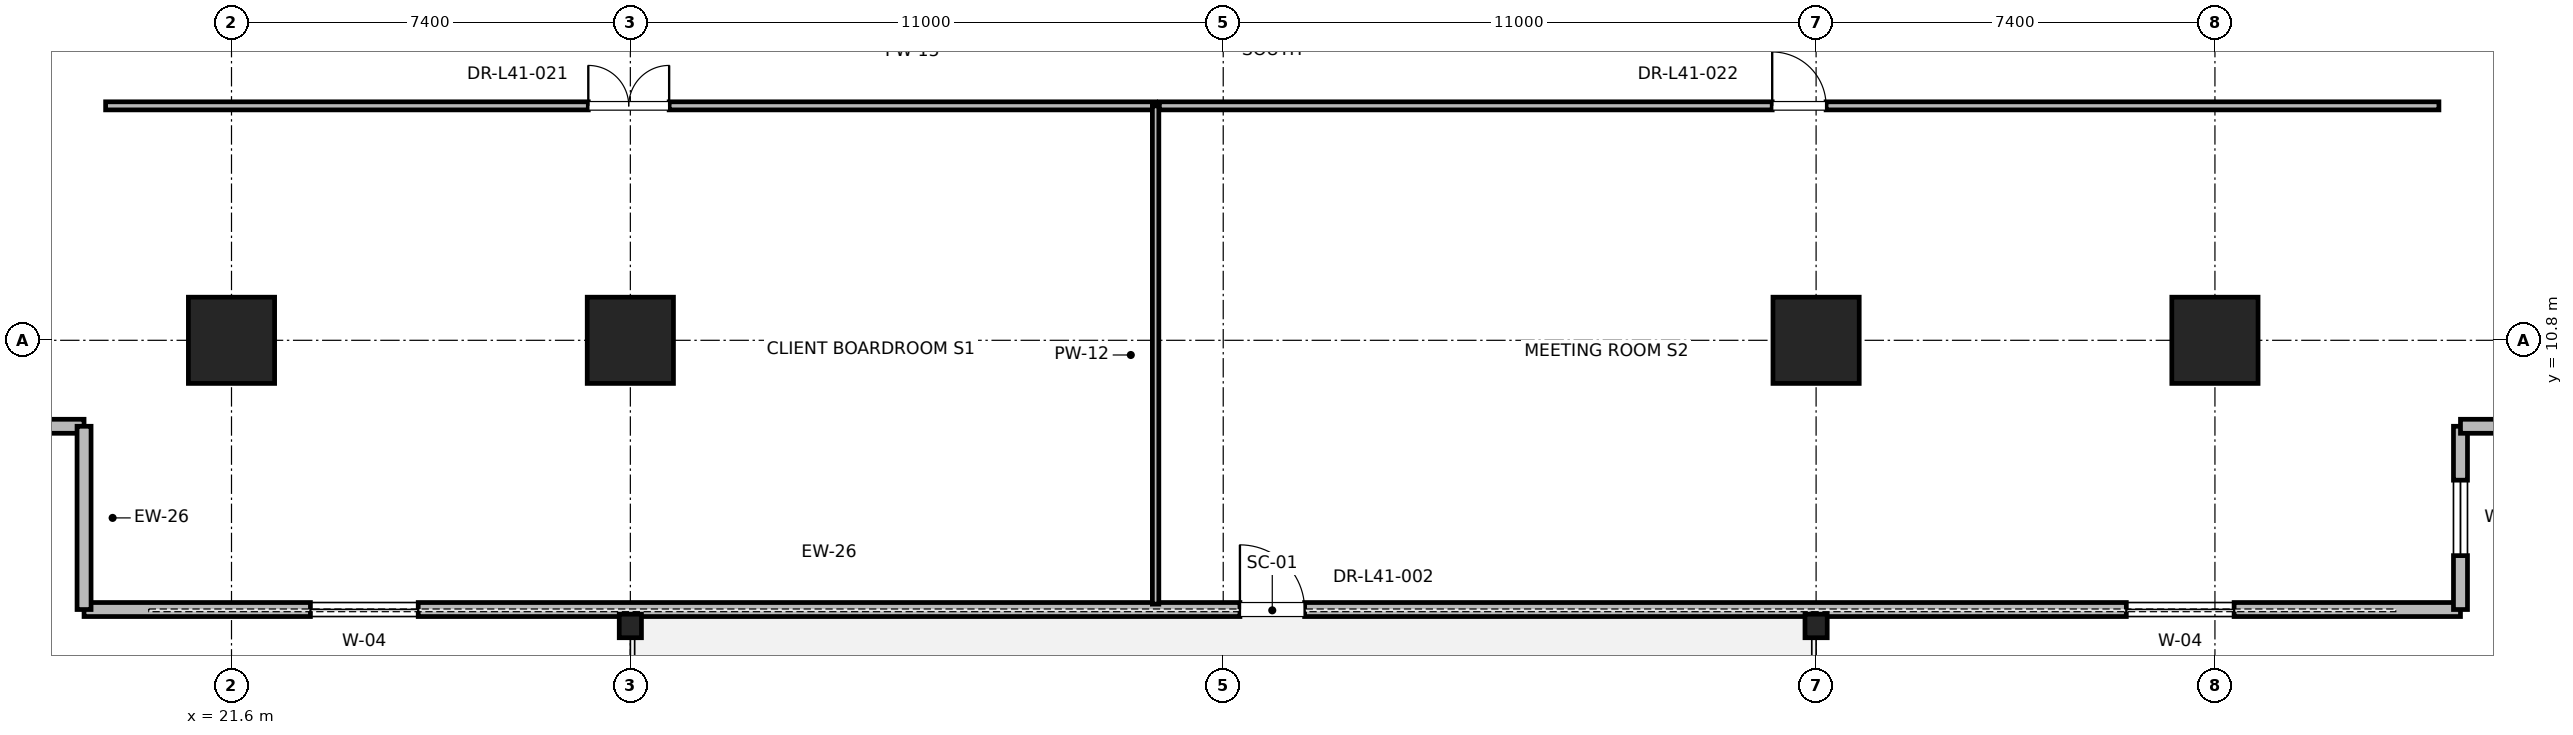
"""IFC4 building model, lengths in metres.
Left out: names, types, materials, properties, quantities, classifications, styles, units other than length and angle.
Written with IfcOpenShell. Run it as: python <this file> out.ifc"""

import sys

from ifc_helpers import new_model, si_unit, direction, frame, frame_2d, origin, origin_2d, place, context, subcontext, project, spatial, rectangle, i_section, extrude, element, fill, save


model = new_model("IFC4")
c1 = context("Model", 3, precision=1e-05, world=origin(), true_north=direction((0.0, 1.0)))
c2 = subcontext(c1, "Body", "Model", "MODEL_VIEW")
j1 = project(units=[si_unit("LENGTHUNIT", "METRE"), si_unit("PLANEANGLEUNIT", "RADIAN")], contexts=[c1])
p1 = place(None, origin())
s1 = spatial("IfcSite", under=j1, at=p1, CompositionType="ELEMENT")
p2 = place(p1, origin())
s2 = spatial("IfcBuilding", under=s1, at=p2, CompositionType="ELEMENT")
p3 = place(p2, frame((0.0, 0.0, 176.4)))
s3 = spatial("IfcBuildingStorey", under=s2, at=p3, CompositionType="ELEMENT", Elevation=176.4)
for number, where, z_axis, x_axis in (
    (1, (29.0, 10.8, 0.0), (0.0, 0.0, 1.0), (1.0, 0.0, 0.0)),
    (2, (51.0, 10.8, 0.0), (0.0, 0.0, 1.0), (1.0, 0.0, 0.0)),
    (3, (21.6, 10.8, 0.0), (0.0, 0.0, 1.0), (1.0, 0.0, 0.0)),
    (4, (58.4, 10.8, 0.0), (0.0, 0.0, 1.0), (1.0, 0.0, 0.0)),
):
    element("IfcColumn", number, at=place(p3, frame(where, z_axis=z_axis, x_axis=x_axis)), inside=s3, PredefinedType="COLUMN", context=c2, shape_type="SweptSolid", body=[
        extrude(rectangle(XDim=1.6, YDim=1.6, at=origin_2d()), origin(), (0.0, 0.0, 1.0), 4.0),
    ])
for number, where, z_axis, x_axis in (
    (5, (29.0, 5.5, 0.0), (0.0, 0.0, 1.0), (1.0, 0.0, 0.0)),
    (6, (51.0, 5.5, 0.0), (0.0, 0.0, 1.0), (1.0, 0.0, 0.0)),
):
    element("IfcColumn", number, at=place(p3, frame(where, z_axis=z_axis, x_axis=x_axis)), inside=s3, PredefinedType="COLUMN", context=c2, shape_type="SweptSolid", body=[
        extrude(i_section(OverallWidth=0.412, OverallDepth=0.437, WebThickness=0.036, FlangeThickness=0.058, FilletRadius=0.015, at=origin_2d()), origin(), (0.0, 0.0, 1.0), 4.0),
    ])
p4 = place(p3, frame((18.864, 5.805, 0.0), z_axis=(0.0, 0.0, 1.0), x_axis=(1.0, 0.0, 0.0)))
e7 = element("IfcWall", 7, at=p4, inside=s3, PredefinedType="PARAPET", context=c2, shape_type="SweptSolid", body=[
    extrude(rectangle(XDim=44.092, YDim=0.26, at=frame_2d((22.046, 0.0))), origin(), (0.0, 0.0, 1.0), 2.97),
])
p5 = place(p4, frame((4.2, 0.0, 0.85)))
e8 = element("IfcOpeningElement", 8, at=p5, cuts=e7, PredefinedType="OPENING", context=c2, shape_type="SweptSolid", body=[
    extrude(rectangle(XDim=2.0, YDim=2.3, at=frame_2d((1.0, 1.15))), frame((0.0, 0.13, 0.0), z_axis=(0.0, -1.0, 0.0), x_axis=(1.0, 0.0, 0.0)), (0.0, 0.0, 1.0), 0.26),
])
p6 = place(p4, frame((21.446, 0.0, 0.0)))
e9 = element("IfcOpeningElement", 9, at=p6, cuts=e7, PredefinedType="OPENING", context=c2, shape_type="SweptSolid", body=[
    extrude(rectangle(XDim=1.2, YDim=2.2, at=frame_2d((0.6, 1.1))), frame((0.0, 0.13, 0.0), z_axis=(0.0, -1.0, 0.0), x_axis=(1.0, 0.0, 0.0)), (0.0, 0.0, 1.0), 0.26),
])
p7 = place(p4, frame((37.891, 0.0, 0.85)))
e10 = element("IfcOpeningElement", 10, at=p7, cuts=e7, PredefinedType="OPENING", context=c2, shape_type="SweptSolid", body=[
    extrude(rectangle(XDim=2.0, YDim=2.3, at=frame_2d((1.0, 1.15))), frame((0.0, 0.13, 0.0), z_axis=(0.0, -1.0, 0.0), x_axis=(1.0, 0.0, 0.0)), (0.0, 0.0, 1.0), 0.26),
])
p8 = place(p3, frame((15.064, 9.205, 0.0), z_axis=(0.0, 0.0, 1.0), x_axis=(1.0, 0.0, 0.0)))
e11 = element("IfcWall", 11, at=p8, inside=s3, PredefinedType="PARAPET", context=c2, shape_type="SweptSolid", body=[
    extrude(rectangle(XDim=3.8, YDim=0.26, at=frame_2d((1.9, 0.0))), origin(), (0.0, 0.0, 1.0), 3.775),
])
p9 = place(p8, frame((1.2, 0.0, 0.85)))
e12 = element("IfcOpeningElement", 12, at=p9, cuts=e11, PredefinedType="OPENING", context=c2, shape_type="SweptSolid", body=[
    extrude(rectangle(XDim=1.4, YDim=2.0, at=frame_2d((0.7, 1.0))), frame((0.0, 0.13, 0.0), z_axis=(0.0, -1.0, 0.0), x_axis=(1.0, 0.0, 0.0)), (0.0, 0.0, 1.0), 0.26),
])
p10 = place(p3, frame((18.864, 9.205, 0.0), z_axis=(0.0, 0.0, 1.0), x_axis=(0.0, -1.0, 0.0)))
e13 = element("IfcWall", 13, at=p10, inside=s3, PredefinedType="PARAPET", context=c2, shape_type="SweptSolid", body=[
    extrude(rectangle(XDim=3.4, YDim=0.26, at=frame_2d((1.7, 0.0))), origin(), (0.0, 0.0, 1.0), 3.775),
])
p11 = place(p3, frame((62.956, 5.805, 0.0), z_axis=(0.0, 0.0, 1.0), x_axis=(0.0, 1.0, 0.0)))
e14 = element("IfcWall", 14, at=p11, inside=s3, PredefinedType="PARAPET", context=c2, shape_type="SweptSolid", body=[
    extrude(rectangle(XDim=3.4, YDim=0.26, at=frame_2d((1.7, 0.0))), origin(), (0.0, 0.0, 1.0), 3.775),
])
p12 = place(p11, frame((1.0, 0.0, 0.85)))
e15 = element("IfcOpeningElement", 15, at=p12, cuts=e14, PredefinedType="OPENING", context=c2, shape_type="SweptSolid", body=[
    extrude(rectangle(XDim=1.4, YDim=2.0, at=frame_2d((0.7, 1.0))), frame((0.0, 0.13, 0.0), z_axis=(0.0, -1.0, 0.0), x_axis=(1.0, 0.0, 0.0)), (0.0, 0.0, 1.0), 0.26),
])
p13 = place(p3, frame((62.956, 9.205, 0.0), z_axis=(0.0, 0.0, 1.0), x_axis=(1.0, 0.0, 0.0)))
e16 = element("IfcWall", 16, at=p13, inside=s3, PredefinedType="PARAPET", context=c2, shape_type="SweptSolid", body=[
    extrude(rectangle(XDim=3.8, YDim=0.26, at=frame_2d((1.9, 0.0))), origin(), (0.0, 0.0, 1.0), 3.775),
])
p14 = place(p3, frame((19.264, 15.15, 0.0), z_axis=(0.0, 0.0, 1.0), x_axis=(1.0, 0.0, 0.0)))
e17 = element("IfcWall", 17, at=p14, inside=s3, PredefinedType="PARTITIONING", context=c2, shape_type="SweptSolid", body=[
    extrude(rectangle(XDim=19.481, YDim=0.15, at=frame_2d((9.74, 0.0))), origin(), (0.0, 0.0, 1.0), 2.85),
])
p15 = place(p14, frame((8.956, 0.0, 0.0)))
e18 = element("IfcOpeningElement", 18, at=p15, cuts=e17, PredefinedType="OPENING", context=c2, shape_type="SweptSolid", body=[
    extrude(rectangle(XDim=1.5, YDim=2.25, at=frame_2d((0.75, 1.125))), frame((0.0, 0.075, 0.0), z_axis=(0.0, -1.0, 0.0), x_axis=(1.0, 0.0, 0.0)), (0.0, 0.0, 1.0), 0.15),
])
p16 = place(p3, frame((38.745, 5.905, 0.0), z_axis=(0.0, 0.0, 1.0), x_axis=(0.0, 1.0, 0.0)))
e19 = element("IfcWall", 19, at=p16, inside=s3, PredefinedType="PARTITIONING", context=c2, shape_type="SweptSolid", body=[
    extrude(rectangle(XDim=9.245, YDim=0.12, at=frame_2d((4.623, 0.0))), origin(), (0.0, 0.0, 1.0), 2.405),
])
p17 = place(p3, frame((38.815, 15.15, 0.0), z_axis=(0.0, 0.0, 1.0), x_axis=(1.0, 0.0, 0.0)))
e20 = element("IfcWall", 20, at=p17, inside=s3, PredefinedType="PARTITIONING", context=c2, shape_type="SweptSolid", body=[
    extrude(rectangle(XDim=23.74, YDim=0.15, at=frame_2d((11.87, 0.0))), origin(), (0.0, 0.0, 1.0), 2.85),
])
p18 = place(p17, frame((11.37, 0.0, 0.0)))
e21 = element("IfcOpeningElement", 21, at=p18, cuts=e20, PredefinedType="OPENING", context=c2, shape_type="SweptSolid", body=[
    extrude(rectangle(XDim=1.0, YDim=2.15, at=frame_2d((0.5, 1.075))), frame((0.0, 0.075, 0.0), z_axis=(0.0, -1.0, 0.0), x_axis=(1.0, 0.0, 0.0)), (0.0, 0.0, 1.0), 0.15),
])
p19 = place(p5, origin())
e22 = element("IfcWindow", 22, at=p19, inside=s3, PartitioningType="SINGLE_PANEL", PredefinedType="WINDOW", context=c2, shape_type="SweptSolid", body=[
    extrude(rectangle(XDim=2.0, YDim=2.3, at=frame_2d((1.0, 1.15))), frame((0.0, 0.03, 0.0), z_axis=(0.0, -1.0, 0.0), x_axis=(1.0, 0.0, 0.0)), (0.0, 0.0, 1.0), 0.06),
])
fill(e8, e22)
p20 = place(p6, origin())
e23 = element("IfcDoor", 23, at=p20, inside=s3, OperationType="SINGLE_SWING_LEFT", PredefinedType="DOOR", context=c2, shape_type="SweptSolid", body=[
    extrude(rectangle(XDim=1.2, YDim=2.2, at=frame_2d((0.6, 1.1))), frame((0.0, 0.025, 0.0), z_axis=(0.0, -1.0, 0.0), x_axis=(1.0, 0.0, 0.0)), (0.0, 0.0, 1.0), 0.05),
])
fill(e9, e23)
p21 = place(p7, origin())
e24 = element("IfcWindow", 24, at=p21, inside=s3, PartitioningType="SINGLE_PANEL", PredefinedType="WINDOW", context=c2, shape_type="SweptSolid", body=[
    extrude(rectangle(XDim=2.0, YDim=2.3, at=frame_2d((1.0, 1.15))), frame((0.0, 0.03, 0.0), z_axis=(0.0, -1.0, 0.0), x_axis=(1.0, 0.0, 0.0)), (0.0, 0.0, 1.0), 0.06),
])
fill(e10, e24)
p22 = place(p12, origin())
e25 = element("IfcWindow", 25, at=p22, inside=s3, PartitioningType="SINGLE_PANEL", PredefinedType="WINDOW", context=c2, shape_type="SweptSolid", body=[
    extrude(rectangle(XDim=1.4, YDim=2.0, at=frame_2d((0.7, 1.0))), frame((0.0, 0.03, 0.0), z_axis=(0.0, -1.0, 0.0), x_axis=(1.0, 0.0, 0.0)), (0.0, 0.0, 1.0), 0.06),
])
fill(e15, e25)
p23 = place(p15, origin())
e26 = element("IfcDoor", 26, at=p23, inside=s3, OperationType="DOUBLE_DOOR_SINGLE_SWING", PredefinedType="DOOR", context=c2, shape_type="SweptSolid", body=[
    extrude(rectangle(XDim=1.5, YDim=2.25, at=frame_2d((0.75, 1.125))), frame((0.0, 0.025, 0.0), z_axis=(0.0, -1.0, 0.0), x_axis=(1.0, 0.0, 0.0)), (0.0, 0.0, 1.0), 0.05),
])
fill(e18, e26)
p24 = place(p18, origin())
e27 = element("IfcDoor", 27, at=p24, inside=s3, OperationType="SINGLE_SWING_LEFT", PredefinedType="DOOR", context=c2, shape_type="SweptSolid", body=[
    extrude(rectangle(XDim=1.0, YDim=2.15, at=frame_2d((0.5, 1.075))), frame((0.0, 0.025, 0.0), z_axis=(0.0, -1.0, 0.0), x_axis=(1.0, 0.0, 0.0)), (0.0, 0.0, 1.0), 0.05),
])
fill(e21, e27)
save(model, sys.argv[1])
